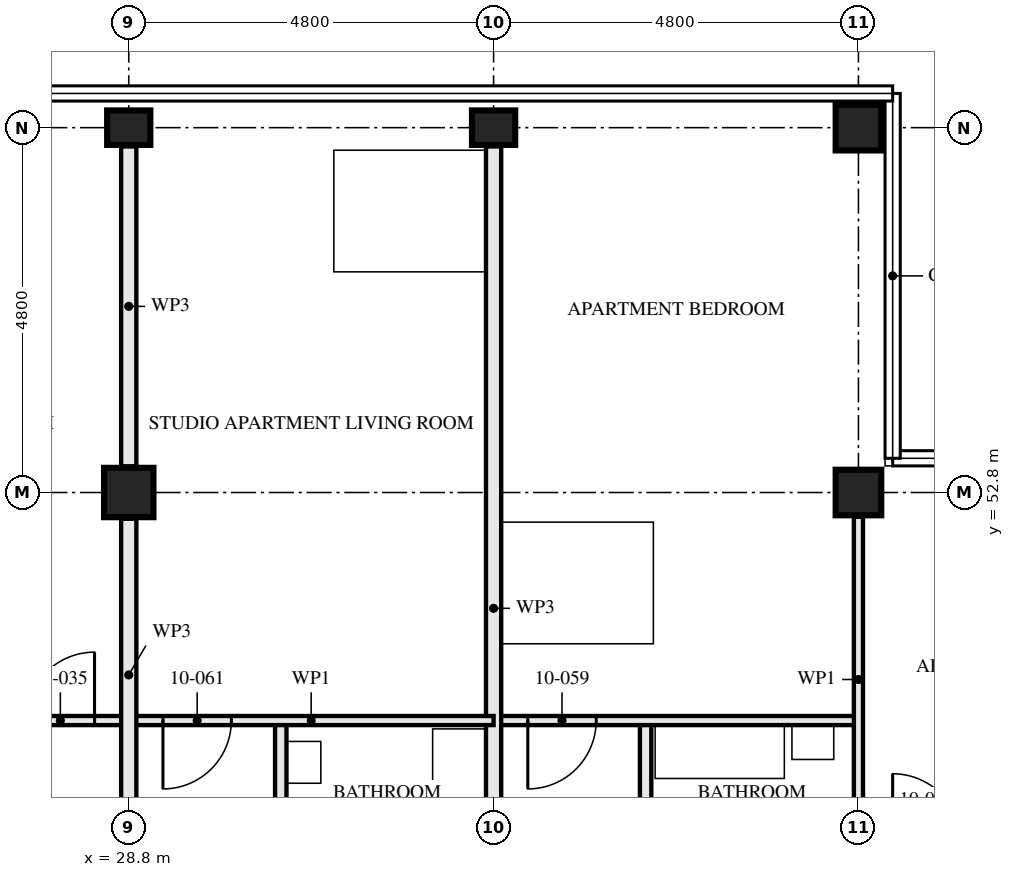
"""IFC4 building model, lengths in metres.
Left out: names, types, materials, properties, quantities, classifications, styles, units other than length and angle.
Written with IfcOpenShell. Run it as: python <this file> out.ifc"""

import sys

from ifc_helpers import new_model, si_unit, direction, frame, frame_2d, origin, origin_2d, place, context, subcontext, project, spatial, rectangle, hollow_rectangle, i_section, extrude, element, fill, save


model = new_model("IFC4")
c1 = context("Model", 3, precision=1e-05, world=origin(), true_north=direction((0.0, 1.0)))
c2 = subcontext(c1, "Body", "Model", "MODEL_VIEW")
j1 = project(units=[si_unit("LENGTHUNIT", "METRE"), si_unit("PLANEANGLEUNIT", "RADIAN")], contexts=[c1])
p1 = place(None, origin())
s1 = spatial("IfcSite", under=j1, at=p1, CompositionType="ELEMENT")
p2 = place(p1, origin())
s2 = spatial("IfcBuilding", under=s1, at=p2, CompositionType="ELEMENT")
p3 = place(p2, frame((0.0, 0.0, 41.0)))
s3 = spatial("IfcBuildingStorey", under=s2, at=p3, CompositionType="ELEMENT", Elevation=41.0)
p4 = place(p3, frame((28.8, 52.8, 0.0), z_axis=(0.0, 0.0, 1.0), x_axis=(1.0, 0.0, 0.0)))
e1 = element("IfcColumn", 1, at=p4, inside=s3, PredefinedType="COLUMN", context=c2, shape_type="SweptSolid", body=[
    extrude(hollow_rectangle(XDim=0.65, YDim=0.65, WallThickness=0.05, at=origin_2d()), origin(), (0.0, 0.0, 1.0), 3.5),
])
for number, where, z_axis, x_axis in (
    (2, (28.8, 57.6, 0.0), (0.0, 0.0, 1.0), (0.0, 1.0, 0.0)),
    (3, (33.6, 57.6, 0.0), (0.0, 0.0, 1.0), (0.0, 1.0, 0.0)),
):
    element("IfcColumn", number, at=place(p3, frame(where, z_axis=z_axis, x_axis=x_axis)), inside=s3, PredefinedType="COLUMN", context=c2, shape_type="SweptSolid", body=[
        extrude(i_section(OverallWidth=0.454, OverallDepth=0.569, WebThickness=0.078, FlangeThickness=0.125, FilletRadius=0.015, at=origin_2d()), origin(), (0.0, 0.0, 1.0), 3.5),
    ])
for number, where, z_axis, x_axis in (
    (4, (38.4, 52.8, 0.0), (0.0, 0.0, 1.0), (0.0, 1.0, 0.0)),
    (5, (38.4, 57.6, 0.0), (0.0, 0.0, 1.0), (0.0, 1.0, 0.0)),
):
    element("IfcColumn", number, at=place(p3, frame(where, z_axis=z_axis, x_axis=x_axis)), inside=s3, PredefinedType="COLUMN", context=c2, shape_type="SweptSolid", body=[
        extrude(hollow_rectangle(XDim=0.6, YDim=0.6, WallThickness=0.05, at=origin_2d()), origin(), (0.0, 0.0, 1.0), 3.5),
    ])
p5 = place(p3, frame((28.8, 49.8, 0.0), z_axis=(0.0, 0.0, 1.0), x_axis=(-1.0, 0.0, 0.0)))
e6 = element("IfcWall", 6, at=p5, inside=s3, PredefinedType="PARTITIONING", context=c2, shape_type="SweptSolid", body=[
    extrude(rectangle(XDim=4.8, YDim=0.12, at=frame_2d((2.4, 0.0))), origin(), (0.0, 0.0, 1.0), 3.33),
])
p6 = place(p5, frame((0.45, 0.0, 0.0)))
e7 = element("IfcOpeningElement", 7, at=p6, cuts=e6, PredefinedType="OPENING", context=c2, shape_type="SweptSolid", body=[
    extrude(rectangle(XDim=0.9, YDim=2.1, at=frame_2d((0.45, 1.05))), frame((0.0, 0.071, 0.0), z_axis=(0.0, -1.0, 0.0), x_axis=(1.0, 0.0, 0.0)), (0.0, 0.0, 1.0), 0.141),
])
p7 = place(p3, frame((35.6, 49.8, 0.0), z_axis=(0.0, 0.0, 1.0), x_axis=(0.0, -1.0, 0.0)))
e8 = element("IfcWall", 8, at=p7, inside=s3, PredefinedType="PARTITIONING", context=c2, shape_type="SweptSolid", body=[
    extrude(rectangle(XDim=3.0, YDim=0.15, at=frame_2d((1.5, 0.0))), origin(), (0.0, 0.0, 1.0), 2.55),
])
p8 = place(p7, frame((1.05, 0.0, 0.0)))
e9 = element("IfcOpeningElement", 9, at=p8, cuts=e8, PredefinedType="OPENING", context=c2, shape_type="SweptSolid", body=[
    extrude(rectangle(XDim=0.9, YDim=2.1, at=frame_2d((0.45, 1.05))), frame((0.0, 0.085, 0.0), z_axis=(0.0, -1.0, 0.0), x_axis=(1.0, 0.0, 0.0)), (0.0, 0.0, 1.0), 0.171),
])
p9 = place(p3, frame((38.4, 49.8, 0.0), z_axis=(0.0, 0.0, 1.0), x_axis=(-1.0, 0.0, 0.0)))
e10 = element("IfcWall", 10, at=p9, inside=s3, PredefinedType="PARTITIONING", context=c2, shape_type="SweptSolid", body=[
    extrude(rectangle(XDim=4.8, YDim=0.12, at=frame_2d((2.4, 0.0))), origin(), (0.0, 0.0, 1.0), 3.33),
])
p10 = place(p9, frame((3.45, 0.0, 0.0)))
e11 = element("IfcOpeningElement", 11, at=p10, cuts=e10, PredefinedType="OPENING", context=c2, shape_type="SweptSolid", body=[
    extrude(rectangle(XDim=0.9, YDim=2.1, at=frame_2d((0.45, 1.05))), frame((0.0, 0.071, 0.0), z_axis=(0.0, -1.0, 0.0), x_axis=(1.0, 0.0, 0.0)), (0.0, 0.0, 1.0), 0.141),
])
p11 = place(p3, frame((38.4, 52.48, 0.0), z_axis=(0.0, 0.0, 1.0), x_axis=(0.0, -1.0, 0.0)))
e12 = element("IfcWall", 12, at=p11, inside=s3, PredefinedType="PARTITIONING", context=c2, shape_type="SweptSolid", body=[
    extrude(rectangle(XDim=4.28, YDim=0.12, at=frame_2d((2.14, 0.0))), origin(), (0.0, 0.0, 1.0), 3.33),
])
p12 = place(p3, frame((33.6, 57.353, 0.0), z_axis=(0.0, 0.0, 1.0), x_axis=(0.0, -1.0, 0.0)))
e13 = element("IfcWall", 13, at=p12, inside=s3, PredefinedType="PARTITIONING", context=c2, shape_type="SweptSolid", body=[
    extrude(rectangle(XDim=12.153, YDim=0.2, at=frame_2d((6.077, 0.0))), origin(), (0.0, 0.0, 1.0), 2.55),
])
p13 = place(p3, frame((30.8, 49.8, 0.0), z_axis=(0.0, 0.0, 1.0), x_axis=(0.0, -1.0, 0.0)))
e14 = element("IfcWall", 14, at=p13, inside=s3, PredefinedType="PARTITIONING", context=c2, shape_type="SweptSolid", body=[
    extrude(rectangle(XDim=3.0, YDim=0.15, at=frame_2d((1.5, 0.0))), origin(), (0.0, 0.0, 1.0), 2.55),
])
p14 = place(p13, frame((1.05, 0.0, 0.0)))
e15 = element("IfcOpeningElement", 15, at=p14, cuts=e14, PredefinedType="OPENING", context=c2, shape_type="SweptSolid", body=[
    extrude(rectangle(XDim=0.9, YDim=2.1, at=frame_2d((0.45, 1.05))), frame((0.0, 0.085, 0.0), z_axis=(0.0, -1.0, 0.0), x_axis=(1.0, 0.0, 0.0)), (0.0, 0.0, 1.0), 0.171),
])
p15 = place(p3, frame((33.6, 49.8, 0.0), z_axis=(0.0, 0.0, 1.0), x_axis=(-1.0, 0.0, 0.0)))
e16 = element("IfcWall", 16, at=p15, inside=s3, PredefinedType="PARTITIONING", context=c2, shape_type="SweptSolid", body=[
    extrude(rectangle(XDim=4.8, YDim=0.12, at=frame_2d((2.4, 0.0))), origin(), (0.0, 0.0, 1.0), 3.33),
])
p16 = place(p15, frame((3.45, 0.0, 0.0)))
e17 = element("IfcOpeningElement", 17, at=p16, cuts=e16, PredefinedType="OPENING", context=c2, shape_type="SweptSolid", body=[
    extrude(rectangle(XDim=0.9, YDim=2.1, at=frame_2d((0.45, 1.05))), frame((0.0, 0.071, 0.0), z_axis=(0.0, -1.0, 0.0), x_axis=(1.0, 0.0, 0.0)), (0.0, 0.0, 1.0), 0.141),
])
p17 = place(p3, frame((28.8, 48.345, 0.0), z_axis=(0.0, 0.0, 1.0), x_axis=(0.0, 1.0, 0.0)))
e18 = element("IfcWall", 18, at=p17, inside=s3, PredefinedType="PARTITIONING", context=c2, shape_type="SweptSolid", body=[
    extrude(rectangle(XDim=4.11, YDim=0.2, at=frame_2d((2.055, 0.0))), origin(), (0.0, 0.0, 1.0), 2.32),
])
p18 = place(p3, frame((28.8, 53.145, 0.0), z_axis=(0.0, 0.0, 1.0), x_axis=(0.0, 1.0, 0.0)))
e19 = element("IfcWall", 19, at=p18, inside=s3, PredefinedType="PARTITIONING", context=c2, shape_type="SweptSolid", body=[
    extrude(rectangle(XDim=4.208, YDim=0.2, at=frame_2d((2.104, 0.0))), origin(), (0.0, 0.0, 1.0), 2.32),
])
p19 = place(p6, frame((0.9, 0.0, 0.0), z_axis=(0.0, 0.0, 1.0), x_axis=(-1.0, 0.0, 0.0)))
e20 = element("IfcDoor", 20, at=p19, inside=s3, OperationType="SINGLE_SWING_LEFT", PredefinedType="DOOR", context=c2, shape_type="SweptSolid", body=[
    extrude(rectangle(XDim=0.9, YDim=2.1, at=frame_2d((0.45, 1.05))), frame((0.0, 0.022, 0.0), z_axis=(0.0, -1.0, 0.0), x_axis=(1.0, 0.0, 0.0)), (0.0, 0.0, 1.0), 0.044),
])
fill(e7, e20)
p20 = place(p10, origin())
e21 = element("IfcDoor", 21, at=p20, inside=s3, OperationType="SINGLE_SWING_LEFT", PredefinedType="DOOR", context=c2, shape_type="SweptSolid", body=[
    extrude(rectangle(XDim=0.9, YDim=2.1, at=frame_2d((0.45, 1.05))), frame((0.0, 0.022, 0.0), z_axis=(0.0, -1.0, 0.0), x_axis=(1.0, 0.0, 0.0)), (0.0, 0.0, 1.0), 0.044),
])
fill(e11, e21)
p21 = place(p16, origin())
e22 = element("IfcDoor", 22, at=p21, inside=s3, OperationType="SINGLE_SWING_LEFT", PredefinedType="DOOR", context=c2, shape_type="SweptSolid", body=[
    extrude(rectangle(XDim=0.9, YDim=2.1, at=frame_2d((0.45, 1.05))), frame((0.0, 0.022, 0.0), z_axis=(0.0, -1.0, 0.0), x_axis=(1.0, 0.0, 0.0)), (0.0, 0.0, 1.0), 0.044),
])
fill(e17, e22)
save(model, sys.argv[1])
